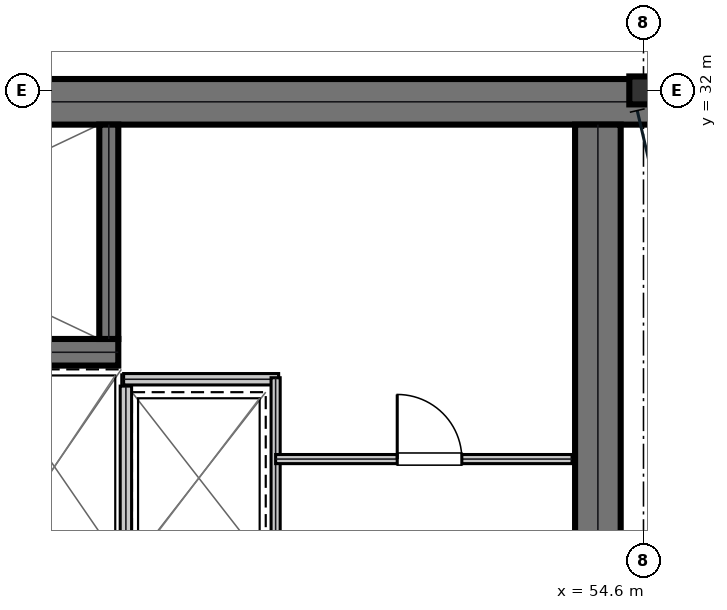
"""IFC4 building model, lengths in metres.
Left out: names, types, materials, properties, quantities, classifications, styles, units other than length and angle.
Written with IfcOpenShell. Run it as: python <this file> out.ifc"""

import sys

from ifc_helpers import new_model, si_unit, direction, frame, frame_2d, origin, origin_2d, place, context, subcontext, project, spatial, rectangle, i_section, extrude, element, fill, save


model = new_model("IFC4")
c1 = context("Model", 3, precision=1e-05, world=origin(), true_north=direction((0.0, 1.0)))
c2 = subcontext(c1, "Body", "Model", "MODEL_VIEW")
j1 = project(units=[si_unit("LENGTHUNIT", "METRE"), si_unit("PLANEANGLEUNIT", "RADIAN")], contexts=[c1])
p1 = place(None, origin())
s1 = spatial("IfcSite", under=j1, at=p1, CompositionType="ELEMENT")
p2 = place(p1, origin())
s2 = spatial("IfcBuilding", under=s1, at=p2, CompositionType="ELEMENT")
p3 = place(p2, frame((0.0, 0.0, 283.05)))
s3 = spatial("IfcBuildingStorey", under=s2, at=p3, CompositionType="ELEMENT", Elevation=283.05)
p4 = place(p3, frame((38.8, 31.85, 0.0), z_axis=(0.0, 0.0, 1.0), x_axis=(1.0, 0.0, 0.0)))
e1 = element("IfcWall", 1, at=p4, inside=s3, PredefinedType="SHEAR", context=c2, shape_type="SweptSolid", body=[
    extrude(rectangle(XDim=16.0, YDim=0.6, at=frame_2d((8.0, 0.0))), origin(), (0.0, 0.0, 1.0), 3.81),
])
p5 = place(p3, frame((54.0, 16.45, 0.0), z_axis=(0.0, 0.0, 1.0), x_axis=(0.0, 1.0, 0.0)))
e2 = element("IfcWall", 2, at=p5, inside=s3, PredefinedType="SHEAR", context=c2, shape_type="SweptSolid", body=[
    extrude(rectangle(XDim=15.1, YDim=0.6, at=frame_2d((7.55, 0.0))), origin(), (0.0, 0.0, 1.0), 3.81),
])
p6 = place(p3, frame((39.98, 28.555, 0.0), z_axis=(0.0, 0.0, 1.0), x_axis=(1.0, 0.0, 0.0)))
e3 = element("IfcWall", 3, at=p6, inside=s3, PredefinedType="SHEAR", context=c2, shape_type="SweptSolid", body=[
    extrude(rectangle(XDim=7.71, YDim=0.35, at=frame_2d((3.855, 0.0))), origin(), (0.0, 0.0, 1.0), 3.81),
])
p7 = place(p6, frame((0.25, 0.0, 0.0)))
e4 = element("IfcOpeningElement", 4, at=p7, cuts=e3, PredefinedType="OPENING", context=c2, shape_type="SweptSolid", body=[
    extrude(rectangle(XDim=1.1, YDim=2.15, at=frame_2d((0.55, 1.075))), frame((0.0, 0.185, 0.0), z_axis=(0.0, -1.0, 0.0), x_axis=(1.0, 0.0, 0.0)), (0.0, 0.0, 1.0), 0.37),
])
p8 = place(p3, frame((47.565, 28.73, 0.0), z_axis=(0.0, 0.0, 1.0), x_axis=(0.0, 1.0, 0.0)))
e5 = element("IfcWall", 5, at=p8, inside=s3, PredefinedType="SHEAR", context=c2, shape_type="SweptSolid", body=[
    extrude(rectangle(XDim=2.82, YDim=0.25, at=frame_2d((1.41, 0.0))), origin(), (0.0, 0.0, 1.0), 3.81),
])
p9 = place(p3, frame((54.6, 32.0, 0.0), z_axis=(0.0, 0.0, 1.0), x_axis=(1.0, 0.0, 0.0)))
e6 = element("IfcColumn", 6, at=p9, inside=s3, PredefinedType="COLUMN", context=c2, shape_type="SweptSolid", body=[
    extrude(i_section(OverallWidth=0.373, OverallDepth=0.368, WebThickness=0.015, FlangeThickness=0.024, at=origin_2d()), origin(), (0.0, 0.0, 1.0), 4.044),
])
p10 = place(p3, frame((47.79, 25.695, 0.0), z_axis=(0.0, 0.0, 1.0), x_axis=(0.0, 1.0, 0.0)))
e7 = element("IfcWall", 7, at=p10, inside=s3, PredefinedType="PARTITIONING", context=c2, shape_type="SweptSolid", body=[
    extrude(rectangle(XDim=2.415, YDim=0.15, at=frame_2d((1.208, 0.0))), origin(), (0.0, 0.0, 1.0), 3.81),
])
p11 = place(p3, frame((47.76, 28.2, 0.0), z_axis=(0.0, 0.0, 1.0), x_axis=(1.0, 0.0, 0.0)))
e8 = element("IfcWall", 8, at=p11, inside=s3, PredefinedType="PARTITIONING", context=c2, shape_type="SweptSolid", body=[
    extrude(rectangle(XDim=2.04, YDim=0.15, at=frame_2d((1.02, 0.0))), origin(), (0.0, 0.0, 1.0), 3.81),
])
p12 = place(p3, frame((49.76, 22.5, 0.0), z_axis=(0.0, 0.0, 1.0), x_axis=(0.0, 1.0, 0.0)))
e9 = element("IfcWall", 9, at=p12, inside=s3, PredefinedType="PARTITIONING", context=c2, shape_type="SweptSolid", body=[
    extrude(rectangle(XDim=5.72, YDim=0.12, at=frame_2d((2.86, 0.0))), origin(), (0.0, 0.0, 1.0), 3.81),
])
p13 = place(p12, frame((0.95, 0.0, 0.0)))
e10 = element("IfcOpeningElement", 10, at=p13, cuts=e9, PredefinedType="OPENING", context=c2, shape_type="SweptSolid", body=[
    extrude(rectangle(XDim=0.95, YDim=2.15, at=frame_2d((0.475, 1.075))), frame((0.0, 0.07, 0.0), z_axis=(0.0, -1.0, 0.0), x_axis=(1.0, 0.0, 0.0)), (0.0, 0.0, 1.0), 0.14),
])
p14 = place(p3, frame((49.76, 27.15, 0.0), z_axis=(0.0, 0.0, 1.0), x_axis=(1.0, 0.0, 0.0)))
e11 = element("IfcWall", 11, at=p14, inside=s3, PredefinedType="PARTITIONING", context=c2, shape_type="SweptSolid", body=[
    extrude(rectangle(XDim=3.9, YDim=0.12, at=frame_2d((1.95, 0.0))), origin(), (0.0, 0.0, 1.0), 3.81),
])
p15 = place(p14, frame((1.6, 0.0, 0.0)))
e12 = element("IfcOpeningElement", 12, at=p15, cuts=e11, PredefinedType="OPENING", context=c2, shape_type="SweptSolid", body=[
    extrude(rectangle(XDim=0.85, YDim=2.15, at=frame_2d((0.425, 1.075))), frame((0.0, 0.07, 0.0), z_axis=(0.0, -1.0, 0.0), x_axis=(1.0, 0.0, 0.0)), (0.0, 0.0, 1.0), 0.14),
])
p16 = place(p15, origin())
e13 = element("IfcDoor", 13, at=p16, inside=s3, OperationType="SINGLE_SWING_LEFT", PredefinedType="DOOR", context=c2, shape_type="SweptSolid", body=[
    extrude(rectangle(XDim=0.85, YDim=2.15, at=frame_2d((0.425, 1.075))), frame((0.0, 0.025, 0.0), z_axis=(0.0, -1.0, 0.0), x_axis=(1.0, 0.0, 0.0)), (0.0, 0.0, 1.0), 0.05),
])
fill(e12, e13)
save(model, sys.argv[1])
